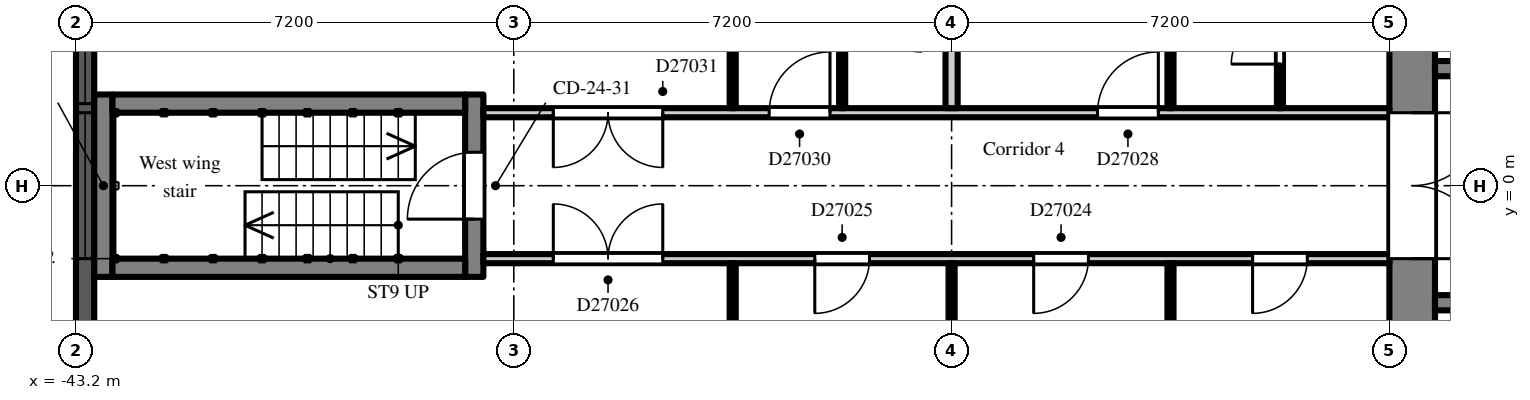
"""IFC4 building model, lengths in metres.
Left out: names, types, materials, properties, quantities, classifications, styles, units other than length and angle.
Written with IfcOpenShell. Run it as: python <this file> out.ifc"""

import sys

from ifc_helpers import new_model, si_unit, direction, frame, frame_2d, origin, place, context, subcontext, project, spatial, rectangle, extrude, element, fill, save


model = new_model("IFC4")
c1 = context("Model", 3, precision=1e-05, world=origin(), true_north=direction((0.0, 1.0)))
c2 = subcontext(c1, "Body", "Model", "MODEL_VIEW")
j1 = project(units=[si_unit("LENGTHUNIT", "METRE"), si_unit("PLANEANGLEUNIT", "RADIAN")], contexts=[c1])
p1 = place(None, origin())
s1 = spatial("IfcSite", under=j1, at=p1, CompositionType="ELEMENT")
p2 = place(p1, origin())
s2 = spatial("IfcBuilding", under=s1, at=p2, CompositionType="ELEMENT")
p3 = place(p2, frame((0.0, 0.0, 188.7)))
s3 = spatial("IfcBuildingStorey", under=s2, at=p3, CompositionType="ELEMENT", Elevation=188.7)
p4 = place(p3, frame((-43.05, 2.7, 0.0), z_axis=(0.0, 0.0, 1.0), x_axis=(0.0, -1.0, 0.0)))
e1 = element("IfcWall", 1, at=p4, inside=s3, PredefinedType="SOLIDWALL", context=c2, shape_type="SweptSolid", body=[
    extrude(rectangle(XDim=5.4, YDim=0.3, at=frame_2d((2.7, 0.0))), origin(), (0.0, 0.0, 1.0), 2.2),
])
p5 = place(p4, frame((1.5, 0.0, 0.2)))
e2 = element("IfcOpeningElement", 2, at=p5, cuts=e1, PredefinedType="OPENING", context=c2, shape_type="SweptSolid", body=[
    extrude(rectangle(XDim=2.4, YDim=1.85, at=frame_2d((1.2, 0.925))), frame((0.0, 0.16, 0.0), z_axis=(0.0, -1.0, 0.0), x_axis=(1.0, 0.0, 0.0)), (0.0, 0.0, 1.0), 0.32),
])
p6 = place(p4, frame((0.15, 0.0, 0.2)))
e3 = element("IfcOpeningElement", 3, at=p6, cuts=e1, PredefinedType="OPENING", context=c2, shape_type="SweptSolid", body=[
    extrude(rectangle(XDim=1.2, YDim=1.85, at=frame_2d((0.6, 0.925))), frame((0.0, 0.16, 0.0), z_axis=(0.0, -1.0, 0.0), x_axis=(1.0, 0.0, 0.0)), (0.0, 0.0, 1.0), 0.32),
])
p7 = place(p3, frame((-21.225, -7.2, 0.0), z_axis=(0.0, 0.0, 1.0), x_axis=(0.0, 1.0, 0.0)))
e4 = element("IfcWall", 4, at=p7, inside=s3, PredefinedType="SHEAR", context=c2, shape_type="SweptSolid", body=[
    extrude(rectangle(XDim=14.4, YDim=0.75, at=frame_2d((7.2, 0.0))), origin(), (0.0, 0.0, 1.0), 2.6),
])
p8 = place(p7, frame((6.0, 0.0, 0.0)))
e5 = element("IfcOpeningElement", 5, at=p8, cuts=e4, PredefinedType="OPENING", context=c2, shape_type="SweptSolid", body=[
    extrude(rectangle(XDim=2.4, YDim=2.2, at=frame_2d((1.2, 1.1))), frame((0.0, 0.385, 0.0), z_axis=(0.0, -1.0, 0.0), x_axis=(1.0, 0.0, 0.0)), (0.0, 0.0, 1.0), 0.77),
])
p9 = place(p3, frame((-7.9, 1.925, 0.0), z_axis=(0.0, 0.0, 1.0), x_axis=(-1.0, 0.0, 0.0)))
e6 = element("IfcWall", 6, at=p9, inside=s3, PredefinedType="SHEAR", context=c2, shape_type="SweptSolid", body=[
    extrude(rectangle(XDim=12.95, YDim=0.25, at=frame_2d((6.475, 0.0))), origin(), (0.0, 0.0, 1.0), 2.6),
])
p10 = place(p9, frame((4.825, 0.0, 0.0)))
e7 = element("IfcOpeningElement", 7, at=p10, cuts=e6, PredefinedType="OPENING", context=c2, shape_type="SweptSolid", body=[
    extrude(rectangle(XDim=1.1, YDim=2.1, at=frame_2d((0.55, 1.05))), frame((0.0, 0.135, 0.0), z_axis=(0.0, -1.0, 0.0), x_axis=(1.0, 0.0, 0.0)), (0.0, 0.0, 1.0), 0.27),
])
p11 = place(p9, frame((7.025, 0.0, 0.0)))
e8 = element("IfcOpeningElement", 8, at=p11, cuts=e6, PredefinedType="OPENING", context=c2, shape_type="SweptSolid", body=[
    extrude(rectangle(XDim=1.1, YDim=2.1, at=frame_2d((0.55, 1.05))), frame((0.0, 0.135, 0.0), z_axis=(0.0, -1.0, 0.0), x_axis=(1.0, 0.0, 0.0)), (0.0, 0.0, 1.0), 0.27),
])
p12 = place(p9, frame((9.225, 0.0, 0.0)))
e9 = element("IfcOpeningElement", 9, at=p12, cuts=e6, PredefinedType="OPENING", context=c2, shape_type="SweptSolid", body=[
    extrude(rectangle(XDim=1.1, YDim=2.1, at=frame_2d((0.55, 1.05))), frame((0.0, 0.135, 0.0), z_axis=(0.0, -1.0, 0.0), x_axis=(1.0, 0.0, 0.0)), (0.0, 0.0, 1.0), 0.27),
])
p13 = place(p9, frame((0.525, 0.0, 0.0)))
e10 = element("IfcOpeningElement", 10, at=p13, cuts=e6, PredefinedType="OPENING", context=c2, shape_type="SweptSolid", body=[
    extrude(rectangle(XDim=0.9, YDim=2.1, at=frame_2d((0.45, 1.05))), frame((0.0, 0.135, 0.0), z_axis=(0.0, -1.0, 0.0), x_axis=(1.0, 0.0, 0.0)), (0.0, 0.0, 1.0), 0.27),
])
p14 = place(p9, frame((2.625, 0.0, 0.0)))
e11 = element("IfcOpeningElement", 11, at=p14, cuts=e6, PredefinedType="OPENING", context=c2, shape_type="SweptSolid", body=[
    extrude(rectangle(XDim=1.1, YDim=2.1, at=frame_2d((0.55, 1.05))), frame((0.0, 0.135, 0.0), z_axis=(0.0, -1.0, 0.0), x_axis=(1.0, 0.0, 0.0)), (0.0, 0.0, 1.0), 0.27),
])
p15 = place(p9, frame((11.525, 0.0, 0.0)))
e12 = element("IfcOpeningElement", 12, at=p15, cuts=e6, PredefinedType="OPENING", context=c2, shape_type="SweptSolid", body=[
    extrude(rectangle(XDim=0.9, YDim=2.1, at=frame_2d((0.45, 1.05))), frame((0.0, 0.135, 0.0), z_axis=(0.0, -1.0, 0.0), x_axis=(1.0, 0.0, 0.0)), (0.0, 0.0, 1.0), 0.27),
])
p16 = place(p3, frame((-7.9, -1.925, 0.0), z_axis=(0.0, 0.0, 1.0), x_axis=(-1.0, 0.0, 0.0)))
e13 = element("IfcWall", 13, at=p16, inside=s3, PredefinedType="SHEAR", context=c2, shape_type="SweptSolid", body=[
    extrude(rectangle(XDim=12.95, YDim=0.25, at=frame_2d((6.475, 0.0))), origin(), (0.0, 0.0, 1.0), 2.6),
])
p17 = place(p16, frame((0.525, 0.0, 0.0)))
e14 = element("IfcOpeningElement", 14, at=p17, cuts=e13, PredefinedType="OPENING", context=c2, shape_type="SweptSolid", body=[
    extrude(rectangle(XDim=0.9, YDim=2.1, at=frame_2d((0.45, 1.05))), frame((0.0, 0.135, 0.0), z_axis=(0.0, -1.0, 0.0), x_axis=(1.0, 0.0, 0.0)), (0.0, 0.0, 1.0), 0.27),
])
p18 = place(p16, frame((2.625, 0.0, 0.0)))
e15 = element("IfcOpeningElement", 15, at=p18, cuts=e13, PredefinedType="OPENING", context=c2, shape_type="SweptSolid", body=[
    extrude(rectangle(XDim=1.1, YDim=2.1, at=frame_2d((0.55, 1.05))), frame((0.0, 0.135, 0.0), z_axis=(0.0, -1.0, 0.0), x_axis=(1.0, 0.0, 0.0)), (0.0, 0.0, 1.0), 0.27),
])
p19 = place(p16, frame((8.225, 0.0, 0.0)))
e16 = element("IfcOpeningElement", 16, at=p19, cuts=e13, PredefinedType="OPENING", context=c2, shape_type="SweptSolid", body=[
    extrude(rectangle(XDim=0.9, YDim=2.1, at=frame_2d((0.45, 1.05))), frame((0.0, 0.135, 0.0), z_axis=(0.0, -1.0, 0.0), x_axis=(1.0, 0.0, 0.0)), (0.0, 0.0, 1.0), 0.27),
])
p20 = place(p3, frame((-36.65, -1.5, 0.0), z_axis=(0.0, 0.0, 1.0), x_axis=(0.0, 1.0, 0.0)))
e17 = element("IfcWall", 17, at=p20, inside=s3, PredefinedType="SHEAR", context=c2, shape_type="SweptSolid", body=[
    extrude(rectangle(XDim=3.0, YDim=0.3, at=frame_2d((1.5, 0.0))), origin(), (0.0, 0.0, 1.0), 2.6),
])
p21 = place(p20, frame((0.95, 0.0, 0.0)))
e18 = element("IfcOpeningElement", 18, at=p21, cuts=e17, PredefinedType="OPENING", context=c2, shape_type="SweptSolid", body=[
    extrude(rectangle(XDim=1.1, YDim=2.1, at=frame_2d((0.55, 1.05))), frame((0.0, 0.16, 0.0), z_axis=(0.0, -1.0, 0.0), x_axis=(1.0, 0.0, 0.0)), (0.0, 0.0, 1.0), 0.32),
])
p22 = place(p3, frame((-42.75, -1.5, 0.0), z_axis=(0.0, 0.0, 1.0), x_axis=(0.0, 1.0, 0.0)))
e19 = element("IfcWall", 19, at=p22, inside=s3, PredefinedType="SHEAR", context=c2, shape_type="SweptSolid", body=[
    extrude(rectangle(XDim=3.0, YDim=0.3, at=frame_2d((1.5, 0.0))), origin(), (0.0, 0.0, 1.0), 2.6),
])
for number, where, z_axis, x_axis in (
    (20, (-36.8, -1.35, 0.0), (0.0, 0.0, 1.0), (-1.0, 0.0, 0.0)),
    (21, (-36.8, 1.35, 0.0), (0.0, 0.0, 1.0), (-1.0, 0.0, 0.0)),
):
    element("IfcWall", number, at=place(p3, frame(where, z_axis=z_axis, x_axis=x_axis)), inside=s3, PredefinedType="SHEAR", context=c2, shape_type="SweptSolid", body=[
        extrude(rectangle(XDim=5.8, YDim=0.3, at=frame_2d((2.9, 0.0))), origin(), (0.0, 0.0, 1.0), 2.6),
    ])
p23 = place(p3, frame((-36.5, -1.2, 0.0), z_axis=(0.0, 0.0, 1.0), x_axis=(1.0, 0.0, 0.0)))
e22 = element("IfcWall", 22, at=p23, inside=s3, PredefinedType="PARTITIONING", context=c2, shape_type="SweptSolid", body=[
    extrude(rectangle(XDim=14.9, YDim=0.15, at=frame_2d((7.45, 0.0))), origin(), (0.0, 0.0, 1.0), 2.6),
])
p24 = place(p23, frame((12.65, 0.0, 0.0)))
e23 = element("IfcOpeningElement", 23, at=p24, cuts=e22, PredefinedType="OPENING", context=c2, shape_type="SweptSolid", body=[
    extrude(rectangle(XDim=0.9, YDim=2.1, at=frame_2d((0.45, 1.05))), frame((0.0, 0.085, 0.0), z_axis=(0.0, -1.0, 0.0), x_axis=(1.0, 0.0, 0.0)), (0.0, 0.0, 1.0), 0.17),
])
p25 = place(p23, frame((9.05, 0.0, 0.0)))
e24 = element("IfcOpeningElement", 24, at=p25, cuts=e22, PredefinedType="OPENING", context=c2, shape_type="SweptSolid", body=[
    extrude(rectangle(XDim=0.9, YDim=2.1, at=frame_2d((0.45, 1.05))), frame((0.0, 0.085, 0.0), z_axis=(0.0, -1.0, 0.0), x_axis=(1.0, 0.0, 0.0)), (0.0, 0.0, 1.0), 0.17),
])
p26 = place(p23, frame((5.45, 0.0, 0.0)))
e25 = element("IfcOpeningElement", 25, at=p26, cuts=e22, PredefinedType="OPENING", context=c2, shape_type="SweptSolid", body=[
    extrude(rectangle(XDim=0.9, YDim=2.1, at=frame_2d((0.45, 1.05))), frame((0.0, 0.085, 0.0), z_axis=(0.0, -1.0, 0.0), x_axis=(1.0, 0.0, 0.0)), (0.0, 0.0, 1.0), 0.17),
])
p27 = place(p23, frame((1.15, 0.0, 0.0)))
e26 = element("IfcOpeningElement", 26, at=p27, cuts=e22, PredefinedType="OPENING", context=c2, shape_type="SweptSolid", body=[
    extrude(rectangle(XDim=1.8, YDim=2.1, at=frame_2d((0.9, 1.05))), frame((0.0, 0.085, 0.0), z_axis=(0.0, -1.0, 0.0), x_axis=(1.0, 0.0, 0.0)), (0.0, 0.0, 1.0), 0.17),
])
p28 = place(p3, frame((-36.5, 1.2, 0.0), z_axis=(0.0, 0.0, 1.0), x_axis=(1.0, 0.0, 0.0)))
e27 = element("IfcWall", 27, at=p28, inside=s3, PredefinedType="PARTITIONING", context=c2, shape_type="SweptSolid", body=[
    extrude(rectangle(XDim=14.9, YDim=0.15, at=frame_2d((7.45, 0.0))), origin(), (0.0, 0.0, 1.0), 2.6),
])
p29 = place(p28, frame((10.1, 0.0, 0.0)))
e28 = element("IfcOpeningElement", 28, at=p29, cuts=e27, PredefinedType="OPENING", context=c2, shape_type="SweptSolid", body=[
    extrude(rectangle(XDim=1.0, YDim=2.1, at=frame_2d((0.5, 1.05))), frame((0.0, 0.085, 0.0), z_axis=(0.0, -1.0, 0.0), x_axis=(1.0, 0.0, 0.0)), (0.0, 0.0, 1.0), 0.17),
])
p30 = place(p28, frame((4.7, 0.0, 0.0)))
e29 = element("IfcOpeningElement", 29, at=p30, cuts=e27, PredefinedType="OPENING", context=c2, shape_type="SweptSolid", body=[
    extrude(rectangle(XDim=1.0, YDim=2.1, at=frame_2d((0.5, 1.05))), frame((0.0, 0.085, 0.0), z_axis=(0.0, -1.0, 0.0), x_axis=(1.0, 0.0, 0.0)), (0.0, 0.0, 1.0), 0.17),
])
p31 = place(p28, frame((1.15, 0.0, 0.0)))
e30 = element("IfcOpeningElement", 30, at=p31, cuts=e27, PredefinedType="OPENING", context=c2, shape_type="SweptSolid", body=[
    extrude(rectangle(XDim=1.8, YDim=2.1, at=frame_2d((0.9, 1.05))), frame((0.0, 0.085, 0.0), z_axis=(0.0, -1.0, 0.0), x_axis=(1.0, 0.0, 0.0)), (0.0, 0.0, 1.0), 0.17),
])
for number, where, z_axis, x_axis in (
    (31, (-32.4, -6.9, 0.0), (0.0, 0.0, 1.0), (0.0, 1.0, 0.0)),
    (32, (-32.4, 1.275, 0.0), (0.0, 0.0, 1.0), (0.0, 1.0, 0.0)),
):
    element("IfcWall", number, at=place(p3, frame(where, z_axis=z_axis, x_axis=x_axis)), inside=s3, PredefinedType="PARTITIONING", context=c2, shape_type="SweptSolid", body=[
        extrude(rectangle(XDim=5.625, YDim=0.1, at=frame_2d((2.812, 0.0))), origin(), (0.0, 0.0, 1.0), 2.6),
    ])
p32 = place(p3, frame((-30.6, 1.275, 0.0), z_axis=(0.0, 0.0, 1.0), x_axis=(0.0, 1.0, 0.0)))
e33 = element("IfcWall", 33, at=p32, inside=s3, PredefinedType="PARTITIONING", context=c2, shape_type="SweptSolid", body=[
    extrude(rectangle(XDim=1.775, YDim=0.1, at=frame_2d((0.888, 0.0))), origin(), (0.0, 0.0, 1.0), 2.6),
])
p33 = place(p3, frame((-28.8, -6.9, 0.0), z_axis=(0.0, 0.0, 1.0), x_axis=(0.0, 1.0, 0.0)))
e34 = element("IfcWall", 34, at=p33, inside=s3, PredefinedType="PARTITIONING", context=c2, shape_type="SweptSolid", body=[
    extrude(rectangle(XDim=5.625, YDim=0.1, at=frame_2d((2.812, 0.0))), origin(), (0.0, 0.0, 1.0), 2.6),
])
p34 = place(p3, frame((-28.8, 1.275, 0.0), z_axis=(0.0, 0.0, 1.0), x_axis=(0.0, 1.0, 0.0)))
e35 = element("IfcWall", 35, at=p34, inside=s3, PredefinedType="PARTITIONING", context=c2, shape_type="SweptSolid", body=[
    extrude(rectangle(XDim=5.625, YDim=0.2, at=frame_2d((2.812, 0.0))), origin(), (0.0, 0.0, 1.0), 2.6),
])
p35 = place(p3, frame((-25.2, -6.9, 0.0), z_axis=(0.0, 0.0, 1.0), x_axis=(0.0, 1.0, 0.0)))
e36 = element("IfcWall", 36, at=p35, inside=s3, PredefinedType="PARTITIONING", context=c2, shape_type="SweptSolid", body=[
    extrude(rectangle(XDim=5.625, YDim=0.1, at=frame_2d((2.812, 0.0))), origin(), (0.0, 0.0, 1.0), 2.6),
])
p36 = place(p3, frame((-25.2, 1.275, 0.0), z_axis=(0.0, 0.0, 1.0), x_axis=(0.0, 1.0, 0.0)))
e37 = element("IfcWall", 37, at=p36, inside=s3, PredefinedType="PARTITIONING", context=c2, shape_type="SweptSolid", body=[
    extrude(rectangle(XDim=2.375, YDim=0.1, at=frame_2d((1.188, 0.0))), origin(), (0.0, 0.0, 1.0), 2.6),
])
p37 = place(p3, frame((-23.4, 1.275, 0.0), z_axis=(0.0, 0.0, 1.0), x_axis=(0.0, 1.0, 0.0)))
e38 = element("IfcWall", 38, at=p37, inside=s3, PredefinedType="PARTITIONING", context=c2, shape_type="SweptSolid", body=[
    extrude(rectangle(XDim=2.275, YDim=0.1, at=frame_2d((1.138, 0.0))), origin(), (0.0, 0.0, 1.0), 2.6),
])
p38 = place(p37, frame((0.725, 0.0, 0.0)))
e39 = element("IfcOpeningElement", 39, at=p38, cuts=e38, PredefinedType="OPENING", context=c2, shape_type="SweptSolid", body=[
    extrude(rectangle(XDim=0.8, YDim=2.1, at=frame_2d((0.4, 1.05))), frame((0.0, 0.06, 0.0), z_axis=(0.0, -1.0, 0.0), x_axis=(1.0, 0.0, 0.0)), (0.0, 0.0, 1.0), 0.12),
])
p39 = place(p5, origin())
e40 = element("IfcWindow", 40, at=p39, inside=s3, PartitioningType="SINGLE_PANEL", PredefinedType="WINDOW", context=c2, shape_type="SweptSolid", body=[
    extrude(rectangle(XDim=2.4, YDim=1.85, at=frame_2d((1.2, 0.925))), frame((0.0, 0.03, 0.0), z_axis=(0.0, -1.0, 0.0), x_axis=(1.0, 0.0, 0.0)), (0.0, 0.0, 1.0), 0.06),
])
fill(e2, e40)
p40 = place(p6, origin())
e41 = element("IfcWindow", 41, at=p40, inside=s3, PartitioningType="SINGLE_PANEL", PredefinedType="WINDOW", context=c2, shape_type="SweptSolid", body=[
    extrude(rectangle(XDim=1.2, YDim=1.85, at=frame_2d((0.6, 0.925))), frame((0.0, 0.03, 0.0), z_axis=(0.0, -1.0, 0.0), x_axis=(1.0, 0.0, 0.0)), (0.0, 0.0, 1.0), 0.06),
])
fill(e3, e41)
p41 = place(p8, frame((2.4, 0.0, 0.0), z_axis=(0.0, 0.0, 1.0), x_axis=(-1.0, 0.0, 0.0)))
e42 = element("IfcDoor", 42, at=p41, inside=s3, OperationType="DOUBLE_DOOR_DOUBLE_SWING", PredefinedType="DOOR", context=c2, shape_type="SweptSolid", body=[
    extrude(rectangle(XDim=2.4, YDim=2.2, at=frame_2d((1.2, 1.1))), frame((0.0, 0.025, 0.0), z_axis=(0.0, -1.0, 0.0), x_axis=(1.0, 0.0, 0.0)), (0.0, 0.0, 1.0), 0.05),
])
fill(e5, e42)
p42 = place(p21, origin())
e43 = element("IfcDoor", 43, at=p42, inside=s3, OperationType="SINGLE_SWING_LEFT", PredefinedType="DOOR", context=c2, shape_type="SweptSolid", body=[
    extrude(rectangle(XDim=1.1, YDim=2.1, at=frame_2d((0.55, 1.05))), frame((0.0, 0.025, 0.0), z_axis=(0.0, -1.0, 0.0), x_axis=(1.0, 0.0, 0.0)), (0.0, 0.0, 1.0), 0.05),
])
fill(e18, e43)
p43 = place(p24, frame((0.9, 0.0, 0.0), z_axis=(0.0, 0.0, 1.0), x_axis=(-1.0, 0.0, 0.0)))
e44 = element("IfcDoor", 44, at=p43, inside=s3, OperationType="SINGLE_SWING_RIGHT", PredefinedType="DOOR", context=c2, shape_type="SweptSolid", body=[
    extrude(rectangle(XDim=0.9, YDim=2.1, at=frame_2d((0.45, 1.05))), frame((0.0, 0.025, 0.0), z_axis=(0.0, -1.0, 0.0), x_axis=(1.0, 0.0, 0.0)), (0.0, 0.0, 1.0), 0.05),
])
fill(e23, e44)
p44 = place(p25, frame((0.9, 0.0, 0.0), z_axis=(0.0, 0.0, 1.0), x_axis=(-1.0, 0.0, 0.0)))
e45 = element("IfcDoor", 45, at=p44, inside=s3, OperationType="SINGLE_SWING_RIGHT", PredefinedType="DOOR", context=c2, shape_type="SweptSolid", body=[
    extrude(rectangle(XDim=0.9, YDim=2.1, at=frame_2d((0.45, 1.05))), frame((0.0, 0.025, 0.0), z_axis=(0.0, -1.0, 0.0), x_axis=(1.0, 0.0, 0.0)), (0.0, 0.0, 1.0), 0.05),
])
fill(e24, e45)
p45 = place(p26, frame((0.9, 0.0, 0.0), z_axis=(0.0, 0.0, 1.0), x_axis=(-1.0, 0.0, 0.0)))
e46 = element("IfcDoor", 46, at=p45, inside=s3, OperationType="SINGLE_SWING_RIGHT", PredefinedType="DOOR", context=c2, shape_type="SweptSolid", body=[
    extrude(rectangle(XDim=0.9, YDim=2.1, at=frame_2d((0.45, 1.05))), frame((0.0, 0.025, 0.0), z_axis=(0.0, -1.0, 0.0), x_axis=(1.0, 0.0, 0.0)), (0.0, 0.0, 1.0), 0.05),
])
fill(e25, e46)
p46 = place(p27, origin())
e47 = element("IfcDoor", 47, at=p46, inside=s3, OperationType="DOUBLE_DOOR_DOUBLE_SWING", PredefinedType="DOOR", context=c2, shape_type="SweptSolid", body=[
    extrude(rectangle(XDim=1.8, YDim=2.1, at=frame_2d((0.9, 1.05))), frame((0.0, 0.025, 0.0), z_axis=(0.0, -1.0, 0.0), x_axis=(1.0, 0.0, 0.0)), (0.0, 0.0, 1.0), 0.05),
])
fill(e26, e47)
p47 = place(p38, origin())
e48 = element("IfcDoor", 48, at=p47, inside=s3, OperationType="SINGLE_SWING_LEFT", PredefinedType="DOOR", context=c2, shape_type="SweptSolid", body=[
    extrude(rectangle(XDim=0.8, YDim=2.1, at=frame_2d((0.4, 1.05))), frame((0.0, 0.025, 0.0), z_axis=(0.0, -1.0, 0.0), x_axis=(1.0, 0.0, 0.0)), (0.0, 0.0, 1.0), 0.05),
])
fill(e39, e48)
p48 = place(p29, origin())
e49 = element("IfcDoor", 49, at=p48, inside=s3, OperationType="SINGLE_SWING_RIGHT", PredefinedType="DOOR", context=c2, shape_type="SweptSolid", body=[
    extrude(rectangle(XDim=1.0, YDim=2.1, at=frame_2d((0.5, 1.05))), frame((0.0, 0.025, 0.0), z_axis=(0.0, -1.0, 0.0), x_axis=(1.0, 0.0, 0.0)), (0.0, 0.0, 1.0), 0.05),
])
fill(e28, e49)
p49 = place(p30, origin())
e50 = element("IfcDoor", 50, at=p49, inside=s3, OperationType="SINGLE_SWING_RIGHT", PredefinedType="DOOR", context=c2, shape_type="SweptSolid", body=[
    extrude(rectangle(XDim=1.0, YDim=2.1, at=frame_2d((0.5, 1.05))), frame((0.0, 0.025, 0.0), z_axis=(0.0, -1.0, 0.0), x_axis=(1.0, 0.0, 0.0)), (0.0, 0.0, 1.0), 0.05),
])
fill(e29, e50)
p50 = place(p31, frame((1.8, 0.0, 0.0), z_axis=(0.0, 0.0, 1.0), x_axis=(-1.0, 0.0, 0.0)))
e51 = element("IfcDoor", 51, at=p50, inside=s3, OperationType="DOUBLE_DOOR_DOUBLE_SWING", PredefinedType="DOOR", context=c2, shape_type="SweptSolid", body=[
    extrude(rectangle(XDim=1.8, YDim=2.1, at=frame_2d((0.9, 1.05))), frame((0.0, 0.025, 0.0), z_axis=(0.0, -1.0, 0.0), x_axis=(1.0, 0.0, 0.0)), (0.0, 0.0, 1.0), 0.05),
])
fill(e30, e51)
save(model, sys.argv[1])
